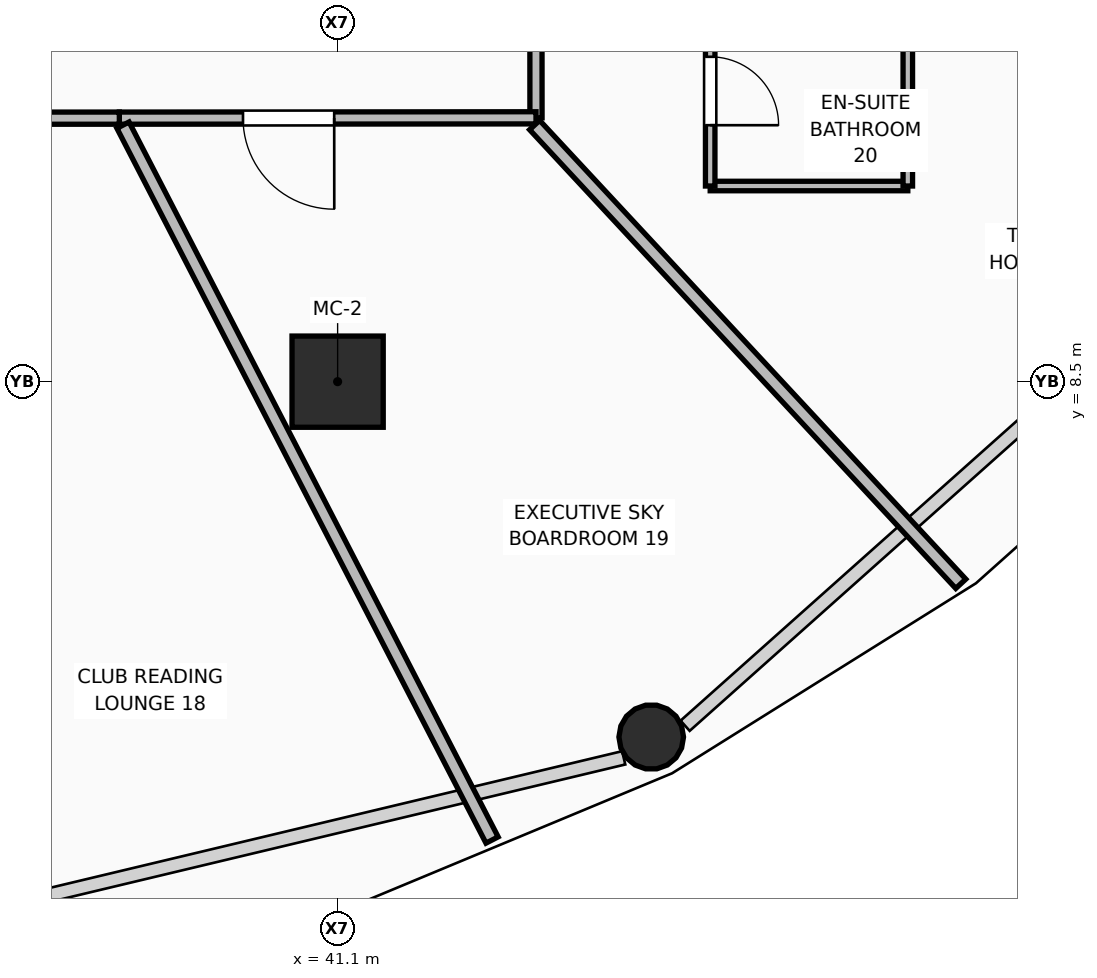
"""IFC4 building model, lengths in metres.
Left out: names, types, materials, properties, quantities, classifications, styles, units other than length and angle.
Written with IfcOpenShell. Run it as: python <this file> out.ifc"""

import sys

from ifc_helpers import new_model, si_unit, direction, frame, frame_2d, origin, origin_2d, place, context, subcontext, project, spatial, rectangle, hollow_rectangle, hollow_circle, extrude, element, fill, save


model = new_model("IFC4")
c1 = context("Model", 3, precision=1e-05, world=origin(), true_north=direction((0.0, 1.0)))
c2 = subcontext(c1, "Body", "Model", "MODEL_VIEW")
j1 = project(units=[si_unit("LENGTHUNIT", "METRE"), si_unit("PLANEANGLEUNIT", "RADIAN")], contexts=[c1])
p1 = place(None, origin())
s1 = spatial("IfcSite", under=j1, at=p1, CompositionType="ELEMENT")
p2 = place(p1, origin())
s2 = spatial("IfcBuilding", under=s1, at=p2, CompositionType="ELEMENT")
p3 = place(p2, frame((0.0, 0.0, 64.5)))
s3 = spatial("IfcBuildingStorey", under=s2, at=p3, CompositionType="ELEMENT", Elevation=64.5)
p4 = place(p3, frame((41.1, 8.5, 0.0), z_axis=(0.0, 0.0, 1.0), x_axis=(1.0, 0.0, 0.0)))
e1 = element("IfcColumn", 1, at=p4, inside=s3, PredefinedType="COLUMN", context=c2, shape_type="SweptSolid", body=[
    extrude(hollow_rectangle(XDim=1.2, YDim=1.2, WallThickness=0.045, at=origin_2d()), origin(), (0.0, 0.0, 1.0), 3.75),
])
p5 = place(p3, frame((45.226, 3.825, 0.0), z_axis=(0.027659758927, -0.043094587365, 0.998688036514), x_axis=(0.841568257174, 0.540150783131, 0.0)))
e2 = element("IfcColumn", 2, at=p5, inside=s3, PredefinedType="COLUMN", context=c2, shape_type="SweptSolid", body=[
    extrude(hollow_circle(Radius=0.425, WallThickness=0.04, at=origin_2d()), origin(), (0.0, 0.0, 1.0), 3.575),
])
p6 = place(p3, frame((43.707, 17.28, 0.0), z_axis=(0.0, 0.0, 1.0), x_axis=(0.000551825539, -0.999999847744, 0.0)))
e3 = element("IfcWall", 3, at=p6, inside=s3, PredefinedType="PARTITIONING", context=c2, shape_type="SweptSolid", body=[
    extrude(rectangle(XDim=5.309, YDim=0.16, at=frame_2d((2.655, 0.0))), origin(), (0.0, 0.0, 1.0), 2.928),
])
p7 = place(p6, frame((0.603, 0.0, 0.0)))
e4 = element("IfcOpeningElement", 4, at=p7, cuts=e3, PredefinedType="OPENING", context=c2, shape_type="SweptSolid", body=[
    extrude(rectangle(XDim=1.0, YDim=2.1, at=frame_2d((0.5, 1.05))), frame((0.0, 0.09, 0.0), z_axis=(0.0, -1.0, 0.0), x_axis=(1.0, 0.0, 0.0)), (0.0, 0.0, 1.0), 0.18),
])
p8 = place(p3, frame((43.71, 11.971, 0.0), z_axis=(0.0, 0.0, 1.0), x_axis=(-0.999999746124, -0.000712567736, 0.0)))
e5 = element("IfcWall", 5, at=p8, inside=s3, PredefinedType="PARTITIONING", context=c2, shape_type="SweptSolid", body=[
    extrude(rectangle(XDim=5.482, YDim=0.16, at=frame_2d((2.741, 0.0))), origin(), (0.0, 0.0, 1.0), 2.928),
])
p9 = place(p8, frame((2.655, 0.0, 0.0)))
e6 = element("IfcOpeningElement", 6, at=p9, cuts=e5, PredefinedType="OPENING", context=c2, shape_type="SweptSolid", body=[
    extrude(rectangle(XDim=1.2, YDim=2.1, at=frame_2d((0.6, 1.05))), frame((0.0, 0.09, 0.0), z_axis=(0.0, -1.0, 0.0), x_axis=(1.0, 0.0, 0.0)), (0.0, 0.0, 1.0), 0.18),
])
p10 = place(p3, frame((38.228, 11.967, 0.0), z_axis=(0.0, 0.0, 1.0), x_axis=(-0.999999890999, -0.000466907852, 0.0)))
e7 = element("IfcWall", 7, at=p10, inside=s3, PredefinedType="PARTITIONING", context=c2, shape_type="SweptSolid", body=[
    extrude(rectangle(XDim=4.183, YDim=0.16, at=frame_2d((2.092, 0.0))), origin(), (0.0, 0.0, 1.0), 3.55),
])
p11 = place(p10, frame((1.492, 0.0, 0.0)))
e8 = element("IfcOpeningElement", 8, at=p11, cuts=e7, PredefinedType="OPENING", context=c2, shape_type="SweptSolid", body=[
    extrude(rectangle(XDim=1.2, YDim=2.1, at=frame_2d((0.6, 1.05))), frame((0.0, 0.09, 0.0), z_axis=(0.0, -1.0, 0.0), x_axis=(1.0, 0.0, 0.0)), (0.0, 0.0, 1.0), 0.18),
])
p12 = place(p3, frame((38.276, 11.875, 0.0), z_axis=(0.0, 0.0, 1.0), x_axis=(0.458791558399, -0.888543924599, 0.0)))
e9 = element("IfcWall", 9, at=p12, inside=s3, PredefinedType="PARTITIONING", context=c2, shape_type="SweptSolid", body=[
    extrude(rectangle(XDim=10.585, YDim=0.18, at=frame_2d((5.292, 0.0))), origin(), (0.0, 0.0, 1.0), 2.775),
])
p13 = place(p3, frame((43.692, 11.876, 0.0), z_axis=(0.0, 0.0, 1.0), x_axis=(0.680668189446, -0.732591848082, 0.0)))
e10 = element("IfcWall", 10, at=p13, inside=s3, PredefinedType="PARTITIONING", context=c2, shape_type="SweptSolid", body=[
    extrude(rectangle(XDim=8.238, YDim=0.18, at=frame_2d((4.119, 0.0))), origin(), (0.0, 0.0, 1.0), 2.775),
])
p14 = place(p3, frame((43.79, 17.227, 0.0), z_axis=(0.0, 0.0, 1.0), x_axis=(0.845148426003, -0.534531699738, 0.0)))
e11 = element("IfcWall", 11, at=p14, inside=s3, PredefinedType="PARTITIONING", context=c2, shape_type="SweptSolid", body=[
    extrude(rectangle(XDim=12.291, YDim=0.18, at=frame_2d((6.146, 0.0))), origin(), (0.0, 0.0, 1.0), 2.775),
])
p15 = place(p3, frame((46.002, 11.074, 0.0), z_axis=(0.0, 0.0, 1.0), x_axis=(1.0, 0.0, 0.0)))
e12 = element("IfcWall", 12, at=p15, inside=s3, PredefinedType="PARTITIONING", context=c2, shape_type="SweptSolid", body=[
    extrude(rectangle(XDim=2.6, YDim=0.125, at=frame_2d((1.3, 0.0))), origin(), (0.0, 0.0, 1.0), 3.55),
])
p16 = place(p3, frame((46.002, 11.074, 0.0), z_axis=(0.0, 0.0, 1.0), x_axis=(0.0, 1.0, 0.0)))
e13 = element("IfcWall", 13, at=p16, inside=s3, PredefinedType="PARTITIONING", context=c2, shape_type="SweptSolid", body=[
    extrude(rectangle(XDim=2.5, YDim=0.125, at=frame_2d((1.25, 0.0))), origin(), (0.0, 0.0, 1.0), 3.55),
])
p17 = place(p16, frame((0.8, 0.0, 0.0)))
e14 = element("IfcOpeningElement", 14, at=p17, cuts=e13, PredefinedType="OPENING", context=c2, shape_type="SweptSolid", body=[
    extrude(rectangle(XDim=0.9, YDim=2.1, at=frame_2d((0.45, 1.05))), frame((0.0, 0.073, 0.0), z_axis=(0.0, -1.0, 0.0), x_axis=(1.0, 0.0, 0.0)), (0.0, 0.0, 1.0), 0.145),
])
p18 = place(p3, frame((48.602, 11.074, 0.0), z_axis=(0.0, 0.0, 1.0), x_axis=(0.0, 1.0, 0.0)))
e15 = element("IfcWall", 15, at=p18, inside=s3, PredefinedType="PARTITIONING", context=c2, shape_type="SweptSolid", body=[
    extrude(rectangle(XDim=2.5, YDim=0.125, at=frame_2d((1.25, 0.0))), origin(), (0.0, 0.0, 1.0), 3.55),
])
p19 = place(p9, origin())
e16 = element("IfcDoor", 16, at=p19, inside=s3, OperationType="SINGLE_SWING_LEFT", PredefinedType="DOOR", context=c2, shape_type="SweptSolid", body=[
    extrude(rectangle(XDim=1.2, YDim=2.1, at=frame_2d((0.6, 1.05))), frame((0.0, 0.025, 0.0), z_axis=(0.0, -1.0, 0.0), x_axis=(1.0, 0.0, 0.0)), (0.0, 0.0, 1.0), 0.05),
])
fill(e6, e16)
p20 = place(p17, frame((0.9, 0.0, 0.0), z_axis=(0.0, 0.0, 1.0), x_axis=(-1.0, 0.0, 0.0)))
e17 = element("IfcDoor", 17, at=p20, inside=s3, OperationType="SINGLE_SWING_RIGHT", PredefinedType="DOOR", context=c2, shape_type="SweptSolid", body=[
    extrude(rectangle(XDim=0.9, YDim=2.1, at=frame_2d((0.45, 1.05))), frame((0.0, 0.025, 0.0), z_axis=(0.0, -1.0, 0.0), x_axis=(1.0, 0.0, 0.0)), (0.0, 0.0, 1.0), 0.05),
])
fill(e14, e17)
save(model, sys.argv[1])
